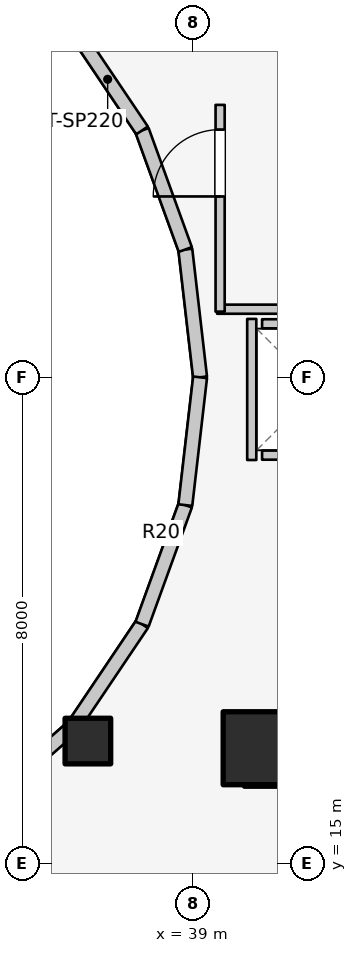
"""IFC4 building model, lengths in metres.
Left out: names, types, materials, properties, quantities, classifications, styles, units other than length and angle.
Written with IfcOpenShell. Run it as: python <this file> out.ifc"""

import sys

from ifc_helpers import new_model, si_unit, direction, frame, frame_2d, origin, origin_2d, place, context, subcontext, project, spatial, rectangle, extrude, element, fill, save


model = new_model("IFC4")
c1 = context("Model", 3, precision=1e-05, world=origin(), true_north=direction((0.0, 1.0)))
c2 = subcontext(c1, "Body", "Model", "MODEL_VIEW")
j1 = project(units=[si_unit("LENGTHUNIT", "METRE"), si_unit("PLANEANGLEUNIT", "RADIAN")], contexts=[c1])
p1 = place(None, origin())
s1 = spatial("IfcSite", under=j1, at=p1, CompositionType="ELEMENT")
p2 = place(p1, origin())
s2 = spatial("IfcBuilding", under=s1, at=p2, CompositionType="ELEMENT")
p3 = place(p2, frame((0.0, 0.0, 187.0)))
s3 = spatial("IfcBuildingStorey", under=s2, at=p3, CompositionType="ELEMENT", Elevation=187.0)
p4 = place(p3, frame((39.85, 16.55, 0.0), z_axis=(0.0, 0.0, 1.0), x_axis=(1.0, 0.0, 0.0)))
e1 = element("IfcWall", 1, at=p4, inside=s3, PredefinedType="SHEAR", context=c2, shape_type="SweptSolid", body=[
    extrude(rectangle(XDim=4.5, YDim=0.55, at=frame_2d((2.25, 0.0))), origin(), (0.0, 0.0, 1.0), 3.1),
])
p5 = place(p3, frame((40.1, 16.9, 0.0), z_axis=(0.0, 0.0, 1.0), x_axis=(1.0, 0.0, 0.0)))
e2 = element("IfcColumn", 2, at=p5, inside=s3, PredefinedType="COLUMN", context=c2, shape_type="SweptSolid", body=[
    extrude(rectangle(XDim=1.2, YDim=1.2, at=origin_2d()), origin(), (0.0, 0.0, 1.0), 3.1),
])
p6 = place(p3, frame((37.275, 17.018, 0.0), z_axis=(0.0, 0.0, 1.0), x_axis=(1.0, 0.0, 0.0)))
e3 = element("IfcColumn", 3, at=p6, inside=s3, PredefinedType="COLUMN", context=c2, shape_type="SweptSolid", body=[
    extrude(rectangle(XDim=0.75, YDim=0.75, at=origin_2d()), origin(), (0.0, 0.0, 1.0), 3.1),
])
p7 = place(p3, frame((39.12, 23.0, 0.0), z_axis=(0.0, 0.0, 1.0), x_axis=(-0.114711713601, 0.993398823617, 0.0)))
e4 = element("IfcWall", 4, at=p7, inside=s3, PredefinedType="STANDARD", context=c2, shape_type="SweptSolid", body=[
    extrude(rectangle(XDim=2.115, YDim=0.23, at=frame_2d((1.058, 0.0))), origin(), (0.0, 0.0, 1.0), 2.56),
])
p8 = place(p3, frame((38.877, 25.102, 0.0), z_axis=(0.0, 0.0, 1.0), x_axis=(-0.341423187295, 0.93990968033, 0.0)))
e5 = element("IfcWall", 5, at=p8, inside=s3, PredefinedType="STANDARD", context=c2, shape_type="SweptSolid", body=[
    extrude(rectangle(XDim=2.084, YDim=0.23, at=frame_2d((1.042, 0.0))), origin(), (0.0, 0.0, 1.0), 2.56),
])
p9 = place(p3, frame((38.166, 27.06, 0.0), z_axis=(0.0, 0.0, 1.0), x_axis=(-0.558197800898, 0.829707909492, 0.0)))
e6 = element("IfcWall", 6, at=p9, inside=s3, PredefinedType="STANDARD", context=c2, shape_type="SweptSolid", body=[
    extrude(rectangle(XDim=2.027, YDim=0.23, at=frame_2d((1.013, 0.0))), origin(), (0.0, 0.0, 1.0), 1.22),
])
p10 = place(p3, frame((35.56, 15.968, 0.0), z_axis=(0.0, 0.0, 1.0), x_axis=(0.752576694707, 0.658504607869, 0.0)))
e7 = element("IfcWall", 7, at=p10, inside=s3, PredefinedType="STANDARD", context=c2, shape_type="SweptSolid", body=[
    extrude(rectangle(XDim=1.959, YDim=0.23, at=frame_2d((0.98, 0.0))), origin(), (0.0, 0.0, 1.0), 1.22),
])
p11 = place(p3, frame((37.035, 17.258, 0.0), z_axis=(0.0, 0.0, 1.0), x_axis=(0.558197800898, 0.829707909492, 0.0)))
e8 = element("IfcWall", 8, at=p11, inside=s3, PredefinedType="STANDARD", context=c2, shape_type="SweptSolid", body=[
    extrude(rectangle(XDim=2.027, YDim=0.23, at=frame_2d((1.013, 0.0))), origin(), (0.0, 0.0, 1.0), 1.22),
])
p12 = place(p3, frame((38.166, 18.94, 0.0), z_axis=(0.0, 0.0, 1.0), x_axis=(0.341423187295, 0.93990968033, 0.0)))
e9 = element("IfcWall", 9, at=p12, inside=s3, PredefinedType="STANDARD", context=c2, shape_type="SweptSolid", body=[
    extrude(rectangle(XDim=2.084, YDim=0.23, at=frame_2d((1.042, 0.0))), origin(), (0.0, 0.0, 1.0), 2.56),
])
p13 = place(p3, frame((38.877, 20.898, 0.0), z_axis=(0.0, 0.0, 1.0), x_axis=(0.114711713601, 0.993398823617, 0.0)))
e10 = element("IfcWall", 10, at=p13, inside=s3, PredefinedType="STANDARD", context=c2, shape_type="SweptSolid", body=[
    extrude(rectangle(XDim=2.115, YDim=0.23, at=frame_2d((1.058, 0.0))), origin(), (0.0, 0.0, 1.0), 2.56),
])
for number, where, z_axis, x_axis in (
    (11, (40.14, 21.72, 0.0), (0.0, 0.0, 1.0), (1.0, 0.0, 0.0)),
    (12, (40.14, 23.88, 0.0), (0.0, 0.0, 1.0), (1.0, 0.0, 0.0)),
):
    element("IfcWall", number, at=place(p3, frame(where, z_axis=z_axis, x_axis=x_axis)), inside=s3, PredefinedType="SOLIDWALL", context=c2, shape_type="SweptSolid", body=[
        extrude(rectangle(XDim=1.82, YDim=0.15, at=frame_2d((0.91, 0.0))), origin(), (0.0, 0.0, 1.0), 2.12),
    ])
p14 = place(p3, frame((39.97, 21.64, 0.0), z_axis=(0.0, 0.0, 1.0), x_axis=(0.0, 1.0, 0.0)))
e13 = element("IfcWall", 13, at=p14, inside=s3, PredefinedType="SOLIDWALL", context=c2, shape_type="SweptSolid", body=[
    extrude(rectangle(XDim=2.32, YDim=0.15, at=frame_2d((1.16, 0.0))), origin(), (0.0, 0.0, 1.0), 2.12),
])
p15 = place(p3, frame((39.4, 24.12, 0.0), z_axis=(0.0, 0.0, 1.0), x_axis=(1.0, 0.0, 0.0)))
e14 = element("IfcWall", 14, at=p15, inside=s3, PredefinedType="PARTITIONING", context=c2, shape_type="SweptSolid", body=[
    extrude(rectangle(XDim=5.08, YDim=0.15, at=frame_2d((2.54, 0.0))), origin(), (0.0, 0.0, 1.0), 2.12),
])
p16 = place(p3, frame((39.45, 24.08, 0.0), z_axis=(0.0, 0.0, 1.0), x_axis=(0.0, 1.0, 0.0)))
e15 = element("IfcWall", 15, at=p16, inside=s3, PredefinedType="PARTITIONING", context=c2, shape_type="SweptSolid", body=[
    extrude(rectangle(XDim=3.4, YDim=0.15, at=frame_2d((1.7, 0.0))), origin(), (0.0, 0.0, 1.0), 2.575),
])
p17 = place(p16, frame((1.894, 0.0, 0.0)))
e16 = element("IfcOpeningElement", 16, at=p17, cuts=e15, PredefinedType="OPENING", context=c2, shape_type="SweptSolid", body=[
    extrude(rectangle(XDim=1.1, YDim=2.1, at=frame_2d((0.55, 1.05))), frame((0.0, 0.085, 0.0), z_axis=(0.0, -1.0, 0.0), x_axis=(1.0, 0.0, 0.0)), (0.0, 0.0, 1.0), 0.17),
])
p18 = place(p3, frame((35.55, 15.985, 0.0), z_axis=(0.0, 0.0, 1.0), x_axis=(0.525627246902, -0.850714991824, 0.0)))
e17 = element("IfcWall", 17, at=p18, inside=s3, PredefinedType="PARTITIONING", context=c2, shape_type="SweptSolid", body=[
    extrude(rectangle(XDim=2.901, YDim=0.125, at=frame_2d((1.451, 0.0))), origin(), (0.0, 0.0, 1.0), 1.22),
])
p19 = place(p17, origin())
e18 = element("IfcDoor", 18, at=p19, inside=s3, OperationType="SINGLE_SWING_LEFT", PredefinedType="DOOR", context=c2, shape_type="SweptSolid", body=[
    extrude(rectangle(XDim=1.1, YDim=2.1, at=frame_2d((0.55, 1.05))), frame((0.0, 0.025, 0.0), z_axis=(0.0, -1.0, 0.0), x_axis=(1.0, 0.0, 0.0)), (0.0, 0.0, 1.0), 0.05),
])
fill(e16, e18)
save(model, sys.argv[1])
